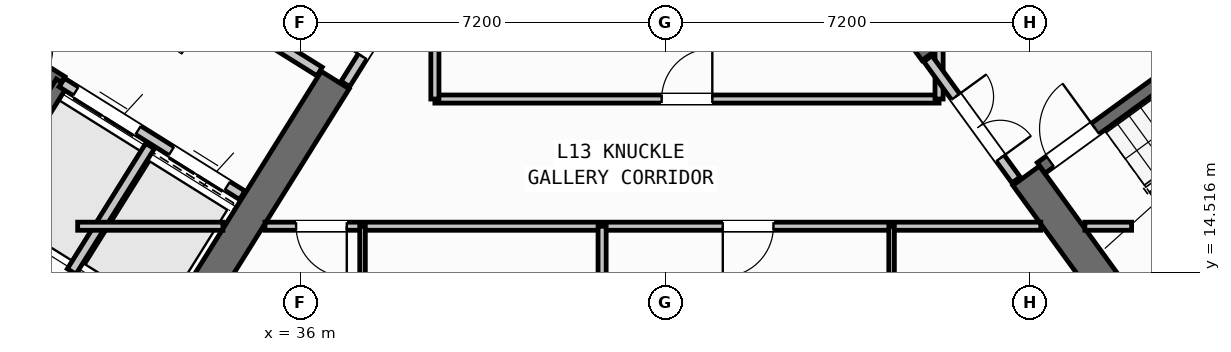
"""IFC4 building model, lengths in metres.
Left out: names, types, materials, properties, quantities, classifications, styles, units other than length and angle.
Written with IfcOpenShell. Run it as: python <this file> out.ifc"""

import sys

from ifc_helpers import new_model, si_unit, direction, frame, frame_2d, origin, place, context, subcontext, project, spatial, rectangle, extrude, source, transform, mapped, element, fill, save


model = new_model("IFC4")
c1 = context("Model", 3, precision=1e-05, world=origin(), true_north=direction((0.0, 1.0)))
c2 = subcontext(c1, "Body", "Model", "MODEL_VIEW")
j1 = project(units=[si_unit("LENGTHUNIT", "METRE"), si_unit("PLANEANGLEUNIT", "RADIAN")], contexts=[c1])
p1 = place(None, origin())
s1 = spatial("IfcSite", under=j1, at=p1, CompositionType="ELEMENT")
p2 = place(p1, origin())
s2 = spatial("IfcBuilding", under=s1, at=p2, CompositionType="ELEMENT")
p3 = place(p2, frame((0.0, 0.0, 52.8)))
s3 = spatial("IfcBuildingStorey", under=s2, at=p3, CompositionType="ELEMENT", Elevation=52.8)
p4 = place(p3, frame((33.409, 12.45, 0.0), z_axis=(0.0, 0.0, 1.0), x_axis=(-0.848051132073, 0.529914405721, 0.0)))
e1 = element("IfcWall", 1, at=p4, inside=s3, PredefinedType="SHEAR", context=c2, shape_type="SweptSolid", body=[
    extrude(rectangle(XDim=13.24, YDim=0.65, at=frame_2d((6.62, 0.0))), origin(), (0.0, 0.0, 1.0), 3.35),
])
p5 = place(p3, frame((36.683, 18.304, 0.0), z_axis=(0.0, 0.0, 1.0), x_axis=(-0.529899109053, -0.848060690178, 0.0)))
e2 = element("IfcWall", 2, at=p5, inside=s3, PredefinedType="SHEAR", context=c2, shape_type="SweptSolid", body=[
    extrude(rectangle(XDim=6.375, YDim=0.65, at=frame_2d((3.188, 0.0))), origin(), (0.0, 0.0, 1.0), 3.35),
])
p6 = place(p3, frame((52.318, 13.11, 0.0), z_axis=(0.0, 0.0, 1.0), x_axis=(0.809019445368, 0.587781878776, 0.0)))
e3 = element("IfcWall", 3, at=p6, inside=s3, PredefinedType="SHEAR", context=c2, shape_type="SweptSolid", body=[
    extrude(rectangle(XDim=12.44, YDim=0.65, at=frame_2d((6.22, 0.0))), origin(), (0.0, 0.0, 1.0), 3.35),
])
p7 = place(p3, frame((52.39, 13.564, 0.0), z_axis=(0.0, 0.0, 1.0), x_axis=(-0.58779688989, 0.809008539037, 0.0)))
e4 = element("IfcWall", 4, at=p7, inside=s3, PredefinedType="SHEAR", context=c2, shape_type="SweptSolid", body=[
    extrude(rectangle(XDim=3.525, YDim=0.65, at=frame_2d((1.763, 0.0))), origin(), (0.0, 0.0, 1.0), 3.35),
])
p8 = place(p3, frame((48.526, 18.884, 0.0), z_axis=(0.0, 0.0, 1.0), x_axis=(-0.58777996584, 0.809020835181, 0.0)))
e5 = element("IfcWall", 5, at=p8, inside=s3, PredefinedType="SHEAR", context=c2, shape_type="SweptSolid", body=[
    extrude(rectangle(XDim=6.375, YDim=0.65, at=frame_2d((3.188, 0.0))), origin(), (0.0, 0.0, 1.0), 3.35),
])
p9 = place(p3, frame((31.28, 18.261, 0.0), z_axis=(0.0, 0.0, 1.0), x_axis=(-0.848051618787, 0.529913626805, 0.0)))
e6 = element("IfcWall", 6, at=p9, inside=s3, PredefinedType="SHEAR", context=c2, shape_type="SweptSolid", body=[
    extrude(rectangle(XDim=7.46, YDim=0.26, at=frame_2d((3.73, 0.0))), origin(), (0.0, 0.0, 1.0), 3.35),
])
p10 = place(p9, frame((0.36, 0.0, 0.0)))
e7 = element("IfcOpeningElement", 7, at=p10, cuts=e6, PredefinedType="OPENING", context=c2, shape_type="SweptSolid", body=[
    extrude(rectangle(XDim=0.86, YDim=2.05, at=frame_2d((0.43, 1.025))), frame((0.0, 0.14, 0.0), z_axis=(0.0, -1.0, 0.0), x_axis=(1.0, 0.0, 0.0)), (0.0, 0.0, 1.0), 0.28),
])
p11 = place(p3, frame((31.288, 18.256, 0.0), z_axis=(0.0, 0.0, 1.0), x_axis=(-0.529943379326, -0.848033026897, 0.0)))
e8 = element("IfcWall", 8, at=p11, inside=s3, PredefinedType="SHEAR", context=c2, shape_type="SweptSolid", body=[
    extrude(rectangle(XDim=3.16, YDim=0.26, at=frame_2d((1.58, 0.0))), origin(), (0.0, 0.0, 1.0), 3.35),
])
p12 = place(p3, frame((34.848, 16.031, 0.0), z_axis=(0.0, 0.0, 1.0), x_axis=(-0.848044042236, 0.529925751807, 0.0)))
e9 = element("IfcWall", 9, at=p12, inside=s3, PredefinedType="STANDARD", context=c2, shape_type="SweptSolid", body=[
    extrude(rectangle(XDim=4.198, YDim=0.2, at=frame_2d((2.099, 0.0))), origin(), (0.0, 0.0, 1.0), 3.34),
])
p13 = place(p12, frame((0.348, 0.0, 0.0)))
e10 = element("IfcOpeningElement", 10, at=p13, cuts=e9, PredefinedType="OPENING", context=c2, shape_type="SweptSolid", body=[
    extrude(rectangle(XDim=1.3, YDim=2.2, at=frame_2d((0.65, 1.1))), frame((0.0, 0.11, 0.0), z_axis=(0.0, -1.0, 0.0), x_axis=(1.0, 0.0, 0.0)), (0.0, 0.0, 1.0), 0.22),
])
p14 = place(p12, frame((2.423, 0.0, 0.0)))
e11 = element("IfcOpeningElement", 11, at=p14, cuts=e9, PredefinedType="OPENING", context=c2, shape_type="SweptSolid", body=[
    extrude(rectangle(XDim=1.45, YDim=2.25, at=frame_2d((0.725, 1.125))), frame((0.0, 0.11, 0.0), z_axis=(0.0, -1.0, 0.0), x_axis=(1.0, 0.0, 0.0)), (0.0, 0.0, 1.0), 0.22),
])
p15 = place(p3, frame((36.374, 18.474, 0.0), z_axis=(0.0, 0.0, 1.0), x_axis=(-0.848051071577, 0.529914502535, 0.0)))
e12 = element("IfcWall", 12, at=p15, inside=s3, PredefinedType="STANDARD", context=c2, shape_type="SweptSolid", body=[
    extrude(rectangle(XDim=5.718, YDim=0.2, at=frame_2d((2.859, 0.0))), origin(), (0.0, 0.0, 1.0), 3.34),
])
p16 = place(p15, frame((2.498, 0.0, 0.0)))
e13 = element("IfcOpeningElement", 13, at=p16, cuts=e12, PredefinedType="OPENING", context=c2, shape_type="SweptSolid", body=[
    extrude(rectangle(XDim=1.15, YDim=2.1, at=frame_2d((0.575, 1.05))), frame((0.0, 0.11, 0.0), z_axis=(0.0, -1.0, 0.0), x_axis=(1.0, 0.0, 0.0)), (0.0, 0.0, 1.0), 0.22),
])
p17 = place(p3, frame((33.029, 17.003, 0.0), z_axis=(0.0, 0.0, 1.0), x_axis=(-0.529916267533, -0.848049968695, 0.0)))
e14 = element("IfcWall", 14, at=p17, inside=s3, PredefinedType="STANDARD", context=c2, shape_type="SweptSolid", body=[
    extrude(rectangle(XDim=2.92, YDim=0.2, at=frame_2d((1.46, 0.0))), origin(), (0.0, 0.0, 1.0), 3.34),
])
p18 = place(p3, frame((52.472, 14.013, 0.0), z_axis=(0.0, 0.0, 1.0), x_axis=(0.809028366311, 0.587769599847, 0.0)))
e15 = element("IfcWall", 15, at=p18, inside=s3, PredefinedType="SHEAR", context=c2, shape_type="SweptSolid", body=[
    extrude(rectangle(XDim=7.33, YDim=0.26, at=frame_2d((3.665, 0.0))), origin(), (0.0, 0.0, 1.0), 3.35),
])
p19 = place(p3, frame((50.615, 16.57, 0.0), z_axis=(0.0, 0.0, 1.0), x_axis=(0.809028366311, 0.587769599847, 0.0)))
e16 = element("IfcWall", 16, at=p19, inside=s3, PredefinedType="SHEAR", context=c2, shape_type="SweptSolid", body=[
    extrude(rectangle(XDim=7.33, YDim=0.26, at=frame_2d((3.665, 0.0))), origin(), (0.0, 0.0, 1.0), 3.35),
])
p20 = place(p19, frame((0.22, 0.0, 0.0)))
e17 = element("IfcOpeningElement", 17, at=p20, cuts=e16, PredefinedType="OPENING", context=c2, shape_type="SweptSolid", body=[
    extrude(rectangle(XDim=1.1, YDim=2.1, at=frame_2d((0.55, 1.05))), frame((0.0, 0.14, 0.0), z_axis=(0.0, -1.0, 0.0), x_axis=(1.0, 0.0, 0.0)), (0.0, 0.0, 1.0), 0.28),
])
p21 = place(p3, frame((32.164, 10.374, 0.0), z_axis=(0.0, 0.0, 1.0), x_axis=(-0.848044107957, 0.529925646633, 0.0)))
e18 = element("IfcWall", 18, at=p21, inside=s3, PredefinedType="PARTITIONING", context=c2, shape_type="SweptSolid", body=[
    extrude(rectangle(XDim=15.57, YDim=0.16, at=frame_2d((7.785, 0.0))), origin(), (0.0, 0.0, 1.0), 3.34),
])
p22 = place(p21, frame((10.83, 0.0, 0.0)))
e19 = element("IfcOpeningElement", 19, at=p22, cuts=e18, PredefinedType="OPENING", context=c2, shape_type="SweptSolid", body=[
    extrude(rectangle(XDim=1.0, YDim=2.1, at=frame_2d((0.5, 1.05))), frame((0.0, 0.09, 0.0), z_axis=(0.0, -1.0, 0.0), x_axis=(1.0, 0.0, 0.0)), (0.0, 0.0, 1.0), 0.18),
])
p23 = place(p3, frame((38.451, 20.737, 0.0), z_axis=(0.0, 0.0, 1.0), x_axis=(-0.529924799939, -0.848044637038, 0.0)))
e20 = element("IfcWall", 20, at=p23, inside=s3, PredefinedType="STANDARD", context=c2, shape_type="SweptSolid", body=[
    extrude(rectangle(XDim=2.96, YDim=0.2, at=frame_2d((1.48, 0.0))), origin(), (0.0, 0.0, 1.0), 3.34),
])
p24 = place(p23, frame((1.46, 0.0, 0.0)))
e21 = element("IfcOpeningElement", 21, at=p24, cuts=e20, PredefinedType="OPENING", context=c2, shape_type="SweptSolid", body=[
    extrude(rectangle(XDim=0.86, YDim=2.05, at=frame_2d((0.43, 1.025))), frame((0.0, 0.11, 0.0), z_axis=(0.0, -1.0, 0.0), x_axis=(1.0, 0.0, 0.0)), (0.0, 0.0, 1.0), 0.22),
])
p25 = place(p3, frame((31.6, 15.42, 0.0), z_axis=(0.0, 0.0, 1.0), x_axis=(1.0, 0.0, 0.0)))
e22 = element("IfcWall", 22, at=p25, inside=s3, PredefinedType="PARTITIONING", context=c2, shape_type="SweptSolid", body=[
    extrude(rectangle(XDim=2.866, YDim=0.16, at=frame_2d((1.433, 0.0))), origin(), (0.0, 0.0, 1.0), 3.34),
])
p26 = place(p3, frame((35.296, 15.42, 0.0), z_axis=(0.0, 0.0, 1.0), x_axis=(1.0, 0.0, 0.0)))
e23 = element("IfcWall", 23, at=p26, inside=s3, PredefinedType="PARTITIONING", context=c2, shape_type="SweptSolid", body=[
    extrude(rectangle(XDim=15.311, YDim=0.16, at=frame_2d((7.655, 0.0))), origin(), (0.0, 0.0, 1.0), 3.34),
])
p27 = place(p26, frame((0.615, 0.0, 0.0)))
e24 = element("IfcOpeningElement", 24, at=p27, cuts=e23, PredefinedType="OPENING", context=c2, shape_type="SweptSolid", body=[
    extrude(rectangle(XDim=1.0, YDim=2.1, at=frame_2d((0.5, 1.05))), frame((0.0, 0.09, 0.0), z_axis=(0.0, -1.0, 0.0), x_axis=(1.0, 0.0, 0.0)), (0.0, 0.0, 1.0), 0.18),
])
p28 = place(p26, frame((9.035, 0.0, 0.0)))
e25 = element("IfcOpeningElement", 25, at=p28, cuts=e23, PredefinedType="OPENING", context=c2, shape_type="SweptSolid", body=[
    extrude(rectangle(XDim=1.0, YDim=2.1, at=frame_2d((0.5, 1.05))), frame((0.0, 0.09, 0.0), z_axis=(0.0, -1.0, 0.0), x_axis=(1.0, 0.0, 0.0)), (0.0, 0.0, 1.0), 0.18),
])
p29 = place(p3, frame((51.477, 15.42, 0.0), z_axis=(0.0, 0.0, 1.0), x_axis=(1.0, 0.0, 0.0)))
e26 = element("IfcWall", 26, at=p29, inside=s3, PredefinedType="PARTITIONING", context=c2, shape_type="SweptSolid", body=[
    extrude(rectangle(XDim=0.923, YDim=0.16, at=frame_2d((0.461, 0.0))), origin(), (0.0, 0.0, 1.0), 3.34),
])
p30 = place(p3, frame((38.65, 17.93, 0.0), z_axis=(0.0, 0.0, 1.0), x_axis=(1.0, 0.0, 0.0)))
e27 = element("IfcWall", 27, at=p30, inside=s3, PredefinedType="PARTITIONING", context=c2, shape_type="SweptSolid", body=[
    extrude(rectangle(XDim=9.95, YDim=0.16, at=frame_2d((4.975, 0.0))), origin(), (0.0, 0.0, 1.0), 3.34),
])
p31 = place(p30, frame((4.475, 0.0, 0.0)))
e28 = element("IfcOpeningElement", 28, at=p31, cuts=e27, PredefinedType="OPENING", context=c2, shape_type="SweptSolid", body=[
    extrude(rectangle(XDim=1.0, YDim=2.1, at=frame_2d((0.5, 1.05))), frame((0.0, 0.09, 0.0), z_axis=(0.0, -1.0, 0.0), x_axis=(1.0, 0.0, 0.0)), (0.0, 0.0, 1.0), 0.18),
])
p32 = place(p3, frame((38.65, 17.93, 0.0), z_axis=(0.0, 0.0, 1.0), x_axis=(0.0, 1.0, 0.0)))
e29 = element("IfcWall", 29, at=p32, inside=s3, PredefinedType="PARTITIONING", context=c2, shape_type="SweptSolid", body=[
    extrude(rectangle(XDim=2.857, YDim=0.16, at=frame_2d((1.428, 0.0))), origin(), (0.0, 0.0, 1.0), 3.34),
])
p33 = place(p3, frame((48.6, 17.93, 0.0), z_axis=(0.0, 0.0, 1.0), x_axis=(0.0, 1.0, 0.0)))
e30 = element("IfcWall", 30, at=p33, inside=s3, PredefinedType="PARTITIONING", context=c2, shape_type="SweptSolid", body=[
    extrude(rectangle(XDim=0.993, YDim=0.16, at=frame_2d((0.496, 0.0))), origin(), (0.0, 0.0, 1.0), 3.34),
])
p34 = place(p3, frame((50.119, 16.333, 0.0), z_axis=(0.0, 0.0, 1.0), x_axis=(-0.587749856981, 0.809042709391, 0.0)))
e31 = element("IfcWall", 31, at=p34, inside=s3, PredefinedType="STANDARD", context=c2, shape_type="SweptSolid", body=[
    extrude(rectangle(XDim=2.96, YDim=0.2, at=frame_2d((1.48, 0.0))), origin(), (0.0, 0.0, 1.0), 3.34),
])
p35 = place(p34, frame((0.53, 0.0, 0.0)))
e32 = element("IfcOpeningElement", 32, at=p35, cuts=e31, PredefinedType="OPENING", context=c2, shape_type="SweptSolid", body=[
    extrude(rectangle(XDim=1.5, YDim=2.15, at=frame_2d((0.75, 1.075))), frame((0.0, 0.11, 0.0), z_axis=(0.0, -1.0, 0.0), x_axis=(1.0, 0.0, 0.0)), (0.0, 0.0, 1.0), 0.22),
])
p36 = place(p3, frame((41.95, 1.96, 0.0), z_axis=(0.0, 0.0, 1.0), x_axis=(0.0, 1.0, 0.0)))
e33 = element("IfcWall", 33, at=p36, inside=s3, PredefinedType="PARTITIONING", context=c2, shape_type="SweptSolid", body=[
    extrude(rectangle(XDim=13.46, YDim=0.16, at=frame_2d((6.73, 0.0))), origin(), (0.0, 0.0, 1.0), 3.34),
])
p37 = place(p3, frame((37.222, 1.96, 0.0), z_axis=(0.0, 0.0, 1.0), x_axis=(0.0, 1.0, 0.0)))
e34 = element("IfcWall", 34, at=p37, inside=s3, PredefinedType="PARTITIONING", context=c2, shape_type="SweptSolid", body=[
    extrude(rectangle(XDim=13.46, YDim=0.11, at=frame_2d((6.73, 0.0))), origin(), (0.0, 0.0, 1.0), 3.34),
])
p38 = place(p37, frame((5.2, 0.0, 0.0)))
e35 = element("IfcOpeningElement", 35, at=p38, cuts=e34, PredefinedType="OPENING", context=c2, shape_type="SweptSolid", body=[
    extrude(rectangle(XDim=0.92, YDim=2.08, at=frame_2d((0.46, 1.04))), frame((0.0, 0.065, 0.0), z_axis=(0.0, -1.0, 0.0), x_axis=(1.0, 0.0, 0.0)), (0.0, 0.0, 1.0), 0.13),
])
p39 = place(p37, frame((10.89, 0.0, 0.0)))
e36 = element("IfcOpeningElement", 36, at=p39, cuts=e34, PredefinedType="OPENING", context=c2, shape_type="SweptSolid", body=[
    extrude(rectangle(XDim=0.88, YDim=2.08, at=frame_2d((0.44, 1.04))), frame((0.0, 0.065, 0.0), z_axis=(0.0, -1.0, 0.0), x_axis=(1.0, 0.0, 0.0)), (0.0, 0.0, 1.0), 0.13),
])
p40 = place(p3, frame((47.663, 1.96, 0.0), z_axis=(0.0, 0.0, 1.0), x_axis=(0.0, 1.0, 0.0)))
e37 = element("IfcWall", 37, at=p40, inside=s3, PredefinedType="PARTITIONING", context=c2, shape_type="SweptSolid", body=[
    extrude(rectangle(XDim=13.46, YDim=0.11, at=frame_2d((6.73, 0.0))), origin(), (0.0, 0.0, 1.0), 3.34),
])
p41 = place(p40, frame((6.3, 0.0, 0.0)))
e38 = element("IfcOpeningElement", 38, at=p41, cuts=e37, PredefinedType="OPENING", context=c2, shape_type="SweptSolid", body=[
    extrude(rectangle(XDim=0.92, YDim=2.08, at=frame_2d((0.46, 1.04))), frame((0.0, 0.065, 0.0), z_axis=(0.0, -1.0, 0.0), x_axis=(1.0, 0.0, 0.0)), (0.0, 0.0, 1.0), 0.13),
])
p42 = place(p40, frame((11.54, 0.0, 0.0)))
e39 = element("IfcOpeningElement", 39, at=p42, cuts=e37, PredefinedType="OPENING", context=c2, shape_type="SweptSolid", body=[
    extrude(rectangle(XDim=0.88, YDim=2.08, at=frame_2d((0.44, 1.04))), frame((0.0, 0.065, 0.0), z_axis=(0.0, -1.0, 0.0), x_axis=(1.0, 0.0, 0.0)), (0.0, 0.0, 1.0), 0.13),
])
m1 = source(origin(), c2, "Body", "SweptSolid", [
    extrude(rectangle(XDim=1.3, YDim=2.2, at=frame_2d((0.65, 1.1))), frame((0.0, 0.025, 0.0), z_axis=(0.0, -1.0, 0.0), x_axis=(1.0, 0.0, 0.0)), (0.0, 0.0, 1.0), 0.05),
])
p43 = place(p13, origin())
e40 = element("IfcDoor", 40, at=p43, inside=s3, OperationType="DOUBLE_DOOR_SLIDING", PredefinedType="DOOR", context=c2, shape_type="MappedRepresentation", body=[
    mapped(m1, transform((0.0, 0.0, 0.0), scale=1.0)),
])
fill(e10, e40)
m2 = source(origin(), c2, "Body", "SweptSolid", [
    extrude(rectangle(XDim=1.45, YDim=2.25, at=frame_2d((0.725, 1.125))), frame((0.0, 0.025, 0.0), z_axis=(0.0, -1.0, 0.0), x_axis=(1.0, 0.0, 0.0)), (0.0, 0.0, 1.0), 0.05),
])
p44 = place(p14, origin())
e41 = element("IfcDoor", 41, at=p44, inside=s3, OperationType="DOUBLE_DOOR_SLIDING", PredefinedType="DOOR", context=c2, shape_type="MappedRepresentation", body=[
    mapped(m2, transform((0.0, 0.0, 0.0), scale=1.0)),
])
fill(e11, e41)
m3 = source(origin(), c2, "Body", "SweptSolid", [
    extrude(rectangle(XDim=1.1, YDim=2.1, at=frame_2d((0.55, 1.05))), frame((0.0, 0.025, 0.0), z_axis=(0.0, -1.0, 0.0), x_axis=(1.0, 0.0, 0.0)), (0.0, 0.0, 1.0), 0.05),
])
p45 = place(p20, origin())
e42 = element("IfcDoor", 42, at=p45, inside=s3, OperationType="SINGLE_SWING_RIGHT", PredefinedType="DOOR", context=c2, shape_type="MappedRepresentation", body=[
    mapped(m3, transform((0.0, 0.0, 0.0), scale=1.0)),
])
fill(e17, e42)
m4 = source(origin(), c2, "Body", "SweptSolid", [
    extrude(rectangle(XDim=1.0, YDim=2.1, at=frame_2d((0.5, 1.05))), frame((0.0, 0.025, 0.0), z_axis=(0.0, -1.0, 0.0), x_axis=(1.0, 0.0, 0.0)), (0.0, 0.0, 1.0), 0.05),
])
p46 = place(p31, origin())
e43 = element("IfcDoor", 43, at=p46, inside=s3, OperationType="SINGLE_SWING_RIGHT", PredefinedType="DOOR", context=c2, shape_type="MappedRepresentation", body=[
    mapped(m4, transform((0.0, 0.0, 0.0), scale=1.0)),
])
fill(e28, e43)
m5 = source(origin(), c2, "Body", "SweptSolid", [
    extrude(rectangle(XDim=0.86, YDim=2.05, at=frame_2d((0.43, 1.025))), frame((0.0, 0.025, 0.0), z_axis=(0.0, -1.0, 0.0), x_axis=(1.0, 0.0, 0.0)), (0.0, 0.0, 1.0), 0.05),
])
p47 = place(p24, frame((0.86, 0.0, 0.0), z_axis=(0.0, 0.0, 1.0), x_axis=(-1.0, 0.0, 0.0)))
e44 = element("IfcDoor", 44, at=p47, inside=s3, OperationType="SINGLE_SWING_LEFT", PredefinedType="DOOR", context=c2, shape_type="MappedRepresentation", body=[
    mapped(m5, transform((0.0, 0.0, 0.0), scale=1.0)),
])
fill(e21, e44)
m6 = source(origin(), c2, "Body", "SweptSolid", [
    extrude(rectangle(XDim=1.5, YDim=2.15, at=frame_2d((0.75, 1.075))), frame((0.0, 0.025, 0.0), z_axis=(0.0, -1.0, 0.0), x_axis=(1.0, 0.0, 0.0)), (0.0, 0.0, 1.0), 0.05),
])
p48 = place(p35, frame((1.5, 0.0, 0.0), z_axis=(0.0, 0.0, 1.0), x_axis=(-1.0, 0.0, 0.0)))
e45 = element("IfcDoor", 45, at=p48, inside=s3, OperationType="DOUBLE_DOOR_SINGLE_SWING", PredefinedType="DOOR", context=c2, shape_type="MappedRepresentation", body=[
    mapped(m6, transform((0.0, 0.0, 0.0), scale=1.0)),
])
fill(e32, e45)
p49 = place(p27, frame((1.0, 0.0, 0.0), z_axis=(0.0, 0.0, 1.0), x_axis=(-1.0, 0.0, 0.0)))
e46 = element("IfcDoor", 46, at=p49, inside=s3, OperationType="SINGLE_SWING_LEFT", PredefinedType="DOOR", context=c2, shape_type="MappedRepresentation", body=[
    mapped(m4, transform((0.0, 0.0, 0.0), scale=1.0)),
])
fill(e24, e46)
p50 = place(p28, frame((1.0, 0.0, 0.0), z_axis=(0.0, 0.0, 1.0), x_axis=(-1.0, 0.0, 0.0)))
e47 = element("IfcDoor", 47, at=p50, inside=s3, OperationType="SINGLE_SWING_RIGHT", PredefinedType="DOOR", context=c2, shape_type="MappedRepresentation", body=[
    mapped(m4, transform((0.0, 0.0, 0.0), scale=1.0)),
])
fill(e25, e47)
save(model, sys.argv[1])
